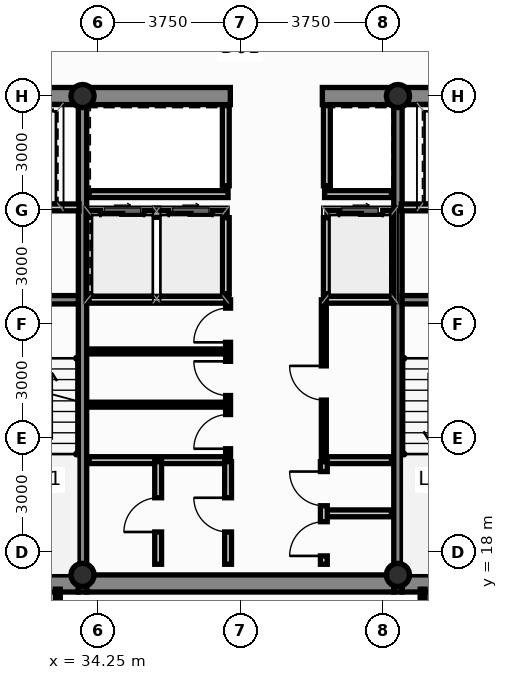
"""IFC4 building model, lengths in metres.
Left out: names, types, materials, properties, quantities, classifications, styles, units other than length and angle.
Written with IfcOpenShell. Run it as: python <this file> out.ifc"""

import sys

from ifc_helpers import new_model, si_unit, direction, frame, frame_2d, origin, origin_2d, place, context, subcontext, project, spatial, rectangle, hollow_circle, extrude, source, transform, mapped, element, fill, save


model = new_model("IFC4")
c1 = context("Model", 3, precision=1e-05, world=origin(), true_north=direction((0.0, 1.0)))
c2 = subcontext(c1, "Body", "Model", "MODEL_VIEW")
j1 = project(units=[si_unit("LENGTHUNIT", "METRE"), si_unit("PLANEANGLEUNIT", "RADIAN")], contexts=[c1])
p1 = place(None, origin())
s1 = spatial("IfcSite", under=j1, at=p1, CompositionType="ELEMENT")
p2 = place(p1, origin())
s2 = spatial("IfcBuilding", under=s1, at=p2, CompositionType="ELEMENT")
p3 = place(p2, frame((0.0, 0.0, 165.8)))
s3 = spatial("IfcBuildingStorey", under=s2, at=p3, CompositionType="ELEMENT", Elevation=165.8)
m1 = source(origin(), c2, "Body", "SweptSolid", [
    extrude(hollow_circle(Radius=0.305, WallThickness=0.025, at=origin_2d()), origin(), (0.0, 0.0, 1.0), 3.65),
])
for number, where, z_axis, x_axis in (
    (1, (33.85, 17.4, 0.0), (0.0, 0.0, 1.0), (1.0, 0.0, 0.0)),
    (2, (42.15, 17.4, 0.0), (0.0, 0.0, 1.0), (1.0, 0.0, 0.0)),
    (3, (33.85, 30.0, 0.0), (0.0, 0.0, 1.0), (1.0, 0.0, 0.0)),
    (4, (42.15, 30.0, 0.0), (0.0, 0.0, 1.0), (1.0, 0.0, 0.0)),
):
    element("IfcColumn", number, at=place(p3, frame(where, z_axis=z_axis, x_axis=x_axis)), inside=s3, PredefinedType="COLUMN", context=c2, shape_type="MappedRepresentation", body=[
        mapped(m1, transform((0.0, 0.0, 0.0), scale=1.0)),
    ])
p4 = place(p3, frame((30.84, 17.175, 0.0), z_axis=(0.0, 0.0, 1.0), x_axis=(1.0, 0.0, 0.0)))
e5 = element("IfcWall", 5, at=p4, inside=s3, PredefinedType="SHEAR", context=c2, shape_type="SweptSolid", body=[
    extrude(rectangle(XDim=2.9, YDim=0.45, at=frame_2d((1.45, 0.0))), origin(), (0.0, 0.0, 1.0), 3.65),
])
p5 = place(p3, frame((33.96, 17.175, 0.0), z_axis=(0.0, 0.0, 1.0), x_axis=(1.0, 0.0, 0.0)))
e6 = element("IfcWall", 6, at=p5, inside=s3, PredefinedType="SHEAR", context=c2, shape_type="SweptSolid", body=[
    extrude(rectangle(XDim=8.08, YDim=0.45, at=frame_2d((4.04, 0.0))), origin(), (0.0, 0.0, 1.0), 3.65),
])
for number, where, z_axis, x_axis in (
    (7, (42.26, 17.175, 0.0), (0.0, 0.0, 1.0), (1.0, 0.0, 0.0)),
    (8, (30.84, 30.0, 0.0), (0.0, 0.0, 1.0), (1.0, 0.0, 0.0)),
):
    element("IfcWall", number, at=place(p3, frame(where, z_axis=z_axis, x_axis=x_axis)), inside=s3, PredefinedType="SHEAR", context=c2, shape_type="SweptSolid", body=[
        extrude(rectangle(XDim=2.9, YDim=0.45, at=frame_2d((1.45, 0.0))), origin(), (0.0, 0.0, 1.0), 3.65),
    ])
p6 = place(p3, frame((33.96, 30.0, 0.0), z_axis=(0.0, 0.0, 1.0), x_axis=(1.0, 0.0, 0.0)))
e9 = element("IfcWall", 9, at=p6, inside=s3, PredefinedType="SHEAR", context=c2, shape_type="SweptSolid", body=[
    extrude(rectangle(XDim=3.78, YDim=0.45, at=frame_2d((1.89, 0.0))), origin(), (0.0, 0.0, 1.0), 3.65),
])
p7 = place(p3, frame((40.16, 30.0, 0.0), z_axis=(0.0, 0.0, 1.0), x_axis=(1.0, 0.0, 0.0)))
e10 = element("IfcWall", 10, at=p7, inside=s3, PredefinedType="SHEAR", context=c2, shape_type="SweptSolid", body=[
    extrude(rectangle(XDim=1.88, YDim=0.45, at=frame_2d((0.94, 0.0))), origin(), (0.0, 0.0, 1.0), 3.65),
])
p8 = place(p3, frame((42.26, 30.0, 0.0), z_axis=(0.0, 0.0, 1.0), x_axis=(1.0, 0.0, 0.0)))
e11 = element("IfcWall", 11, at=p8, inside=s3, PredefinedType="SHEAR", context=c2, shape_type="SweptSolid", body=[
    extrude(rectangle(XDim=2.9, YDim=0.45, at=frame_2d((1.45, 0.0))), origin(), (0.0, 0.0, 1.0), 3.65),
])
for number, where, z_axis, x_axis in (
    (12, (33.85, 16.95, 0.0), (0.0, 0.0, 1.0), (0.0, 1.0, 0.0)),
    (13, (42.15, 16.95, 0.0), (0.0, 0.0, 1.0), (0.0, 1.0, 0.0)),
):
    element("IfcWall", number, at=place(p3, frame(where, z_axis=z_axis, x_axis=x_axis)), inside=s3, PredefinedType="SHEAR", context=c2, shape_type="SweptSolid", body=[
        extrude(rectangle(XDim=13.275, YDim=0.22, at=frame_2d((6.638, 0.0))), origin(), (0.0, 0.0, 1.0), 3.65),
    ])
for number, where, z_axis, x_axis in (
    (14, (30.84, 24.64, 0.0), (0.0, 0.0, 1.0), (1.0, 0.0, 0.0)),
    (15, (42.26, 24.64, 0.0), (0.0, 0.0, 1.0), (1.0, 0.0, 0.0)),
):
    element("IfcWall", number, at=place(p3, frame(where, z_axis=z_axis, x_axis=x_axis)), inside=s3, PredefinedType="SHEAR", context=c2, shape_type="SweptSolid", body=[
        extrude(rectangle(XDim=2.9, YDim=0.22, at=frame_2d((1.45, 0.0))), origin(), (0.0, 0.0, 1.0), 3.65),
    ])
p9 = place(p3, frame((34.02, 26.9, 0.0), z_axis=(0.0, 0.0, 1.0), x_axis=(1.0, 0.0, 0.0)))
e16 = element("IfcWall", 16, at=p9, inside=s3, PredefinedType="PARTITIONING", context=c2, shape_type="SweptSolid", body=[
    extrude(rectangle(XDim=3.6, YDim=0.18, at=frame_2d((1.8, 0.0))), origin(), (0.0, 0.0, 1.0), 3.4),
])
p10 = place(p9, frame((0.3, 0.0, 0.0)))
e17 = element("IfcOpeningElement", 17, at=p10, cuts=e16, PredefinedType="OPENING", context=c2, shape_type="SweptSolid", body=[
    extrude(rectangle(XDim=1.15, YDim=2.2, at=frame_2d((0.575, 1.1))), frame((0.0, 0.102, 0.0), z_axis=(0.0, -1.0, 0.0), x_axis=(1.0, 0.0, 0.0)), (0.0, 0.0, 1.0), 0.204),
])
p11 = place(p9, frame((2.1, 0.0, 0.0)))
e18 = element("IfcOpeningElement", 18, at=p11, cuts=e16, PredefinedType="OPENING", context=c2, shape_type="SweptSolid", body=[
    extrude(rectangle(XDim=1.15, YDim=2.2, at=frame_2d((0.575, 1.1))), frame((0.0, 0.102, 0.0), z_axis=(0.0, -1.0, 0.0), x_axis=(1.0, 0.0, 0.0)), (0.0, 0.0, 1.0), 0.204),
])
p12 = place(p3, frame((40.28, 26.9, 0.0), z_axis=(0.0, 0.0, 1.0), x_axis=(1.0, 0.0, 0.0)))
e19 = element("IfcWall", 19, at=p12, inside=s3, PredefinedType="PARTITIONING", context=c2, shape_type="SweptSolid", body=[
    extrude(rectangle(XDim=1.7, YDim=0.18, at=frame_2d((0.85, 0.0))), origin(), (0.0, 0.0, 1.0), 3.4),
])
p13 = place(p12, frame((0.32, 0.0, 0.0)))
e20 = element("IfcOpeningElement", 20, at=p13, cuts=e19, PredefinedType="OPENING", context=c2, shape_type="SweptSolid", body=[
    extrude(rectangle(XDim=1.15, YDim=2.2, at=frame_2d((0.575, 1.1))), frame((0.0, 0.102, 0.0), z_axis=(0.0, -1.0, 0.0), x_axis=(1.0, 0.0, 0.0)), (0.0, 0.0, 1.0), 0.204),
])
for number, where, z_axis, x_axis in (
    (21, (37.62, 24.8, 0.0), (0.0, 0.0, 1.0), (0.0, 1.0, 0.0)),
    (22, (40.28, 24.8, 0.0), (0.0, 0.0, 1.0), (0.0, 1.0, 0.0)),
):
    element("IfcWall", number, at=place(p3, frame(where, z_axis=z_axis, x_axis=x_axis)), inside=s3, PredefinedType="PARTITIONING", context=c2, shape_type="SweptSolid", body=[
        extrude(rectangle(XDim=2.0, YDim=0.18, at=frame_2d((1.0, 0.0))), origin(), (0.0, 0.0, 1.0), 3.4),
    ])
p14 = place(p3, frame((34.02, 24.64, 0.0), z_axis=(0.0, 0.0, 1.0), x_axis=(1.0, 0.0, 0.0)))
e23 = element("IfcWall", 23, at=p14, inside=s3, PredefinedType="PARTITIONING", context=c2, shape_type="SweptSolid", body=[
    extrude(rectangle(XDim=3.68, YDim=0.18, at=frame_2d((1.84, 0.0))), origin(), (0.0, 0.0, 1.0), 3.4),
])
p15 = place(p3, frame((40.2, 24.64, 0.0), z_axis=(0.0, 0.0, 1.0), x_axis=(1.0, 0.0, 0.0)))
e24 = element("IfcWall", 24, at=p15, inside=s3, PredefinedType="PARTITIONING", context=c2, shape_type="SweptSolid", body=[
    extrude(rectangle(XDim=1.78, YDim=0.18, at=frame_2d((0.89, 0.0))), origin(), (0.0, 0.0, 1.0), 3.4),
])
p16 = place(p3, frame((34.02, 27.42, 0.0), z_axis=(0.0, 0.0, 1.0), x_axis=(1.0, 0.0, 0.0)))
e25 = element("IfcWall", 25, at=p16, inside=s3, PredefinedType="PARTITIONING", context=c2, shape_type="SweptSolid", body=[
    extrude(rectangle(XDim=3.66, YDim=0.18, at=frame_2d((1.83, 0.0))), origin(), (0.0, 0.0, 1.0), 3.4),
])
p17 = place(p3, frame((40.22, 27.42, 0.0), z_axis=(0.0, 0.0, 1.0), x_axis=(1.0, 0.0, 0.0)))
e26 = element("IfcWall", 26, at=p17, inside=s3, PredefinedType="PARTITIONING", context=c2, shape_type="SweptSolid", body=[
    extrude(rectangle(XDim=1.76, YDim=0.18, at=frame_2d((0.88, 0.0))), origin(), (0.0, 0.0, 1.0), 3.4),
])
for number, where, z_axis, x_axis in (
    (27, (37.62, 27.64, 0.0), (0.0, 0.0, 1.0), (0.0, 1.0, 0.0)),
    (28, (40.28, 27.64, 0.0), (0.0, 0.0, 1.0), (0.0, 1.0, 0.0)),
):
    element("IfcWall", number, at=place(p3, frame(where, z_axis=z_axis, x_axis=x_axis)), inside=s3, PredefinedType="PARTITIONING", context=c2, shape_type="SweptSolid", body=[
        extrude(rectangle(XDim=2.11, YDim=0.18, at=frame_2d((1.055, 0.0))), origin(), (0.0, 0.0, 1.0), 3.4),
    ])
for number, where, z_axis, x_axis in (
    (29, (30.86, 27.07, 0.0), (0.0, 0.0, 1.0), (1.0, 0.0, 0.0)),
    (30, (42.24, 27.07, 0.0), (0.0, 0.0, 1.0), (1.0, 0.0, 0.0)),
):
    element("IfcWall", number, at=place(p3, frame(where, z_axis=z_axis, x_axis=x_axis)), inside=s3, PredefinedType="PARTITIONING", context=c2, shape_type="SweptSolid", body=[
        extrude(rectangle(XDim=2.9, YDim=0.18, at=frame_2d((1.45, 0.0))), origin(), (0.0, 0.0, 1.0), 3.4),
    ])
p18 = place(p3, frame((34.02, 20.42, 0.0), z_axis=(0.0, 0.0, 1.0), x_axis=(1.0, 0.0, 0.0)))
e31 = element("IfcWall", 31, at=p18, inside=s3, PredefinedType="PARTITIONING", context=c2, shape_type="SweptSolid", body=[
    extrude(rectangle(XDim=3.64, YDim=0.18, at=frame_2d((1.82, 0.0))), origin(), (0.0, 0.0, 1.0), 3.4),
])
p19 = place(p3, frame((40.22, 20.42, 0.0), z_axis=(0.0, 0.0, 1.0), x_axis=(1.0, 0.0, 0.0)))
e32 = element("IfcWall", 32, at=p19, inside=s3, PredefinedType="PARTITIONING", context=c2, shape_type="SweptSolid", body=[
    extrude(rectangle(XDim=1.76, YDim=0.18, at=frame_2d((0.88, 0.0))), origin(), (0.0, 0.0, 1.0), 3.4),
])
for number, where, z_axis, x_axis in (
    (33, (34.02, 21.88, 0.0), (0.0, 0.0, 1.0), (1.0, 0.0, 0.0)),
    (34, (34.02, 23.28, 0.0), (0.0, 0.0, 1.0), (1.0, 0.0, 0.0)),
):
    element("IfcWall", number, at=place(p3, frame(where, z_axis=z_axis, x_axis=x_axis)), inside=s3, PredefinedType="PARTITIONING", context=c2, shape_type="SweptSolid", body=[
        extrude(rectangle(XDim=3.58, YDim=0.13, at=frame_2d((1.79, 0.0))), origin(), (0.0, 0.0, 1.0), 3.4),
    ])
p20 = place(p3, frame((37.68, 20.5, 0.0), z_axis=(0.0, 0.0, 1.0), x_axis=(0.0, 1.0, 0.0)))
e35 = element("IfcWall", 35, at=p20, inside=s3, PredefinedType="PARTITIONING", context=c2, shape_type="SweptSolid", body=[
    extrude(rectangle(XDim=4.14, YDim=0.13, at=frame_2d((2.07, 0.0))), origin(), (0.0, 0.0, 1.0), 3.4),
])
p21 = place(p20, frame((0.22, 0.0, 0.0)))
e36 = element("IfcOpeningElement", 36, at=p21, cuts=e35, PredefinedType="OPENING", context=c2, shape_type="SweptSolid", body=[
    extrude(rectangle(XDim=0.9, YDim=2.1, at=frame_2d((0.45, 1.05))), frame((0.0, 0.077, 0.0), z_axis=(0.0, -1.0, 0.0), x_axis=(1.0, 0.0, 0.0)), (0.0, 0.0, 1.0), 0.154),
])
p22 = place(p20, frame((1.62, 0.0, 0.0)))
e37 = element("IfcOpeningElement", 37, at=p22, cuts=e35, PredefinedType="OPENING", context=c2, shape_type="SweptSolid", body=[
    extrude(rectangle(XDim=0.9, YDim=2.1, at=frame_2d((0.45, 1.05))), frame((0.0, 0.077, 0.0), z_axis=(0.0, -1.0, 0.0), x_axis=(1.0, 0.0, 0.0)), (0.0, 0.0, 1.0), 0.154),
])
p23 = place(p20, frame((3.02, 0.0, 0.0)))
e38 = element("IfcOpeningElement", 38, at=p23, cuts=e35, PredefinedType="OPENING", context=c2, shape_type="SweptSolid", body=[
    extrude(rectangle(XDim=0.9, YDim=2.1, at=frame_2d((0.45, 1.05))), frame((0.0, 0.077, 0.0), z_axis=(0.0, -1.0, 0.0), x_axis=(1.0, 0.0, 0.0)), (0.0, 0.0, 1.0), 0.154),
])
p24 = place(p3, frame((40.2, 20.5, 0.0), z_axis=(0.0, 0.0, 1.0), x_axis=(0.0, 1.0, 0.0)))
e39 = element("IfcWall", 39, at=p24, inside=s3, PredefinedType="PARTITIONING", context=c2, shape_type="SweptSolid", body=[
    extrude(rectangle(XDim=4.14, YDim=0.13, at=frame_2d((2.07, 0.0))), origin(), (0.0, 0.0, 1.0), 3.4),
])
p25 = place(p24, frame((1.5, 0.0, 0.0)))
e40 = element("IfcOpeningElement", 40, at=p25, cuts=e39, PredefinedType="OPENING", context=c2, shape_type="SweptSolid", body=[
    extrude(rectangle(XDim=0.9, YDim=2.1, at=frame_2d((0.45, 1.05))), frame((0.0, 0.077, 0.0), z_axis=(0.0, -1.0, 0.0), x_axis=(1.0, 0.0, 0.0)), (0.0, 0.0, 1.0), 0.154),
])
p26 = place(p3, frame((35.84, 17.68, 0.0), z_axis=(0.0, 0.0, 1.0), x_axis=(0.0, 1.0, 0.0)))
e41 = element("IfcWall", 41, at=p26, inside=s3, PredefinedType="PARTITIONING", context=c2, shape_type="SweptSolid", body=[
    extrude(rectangle(XDim=2.7, YDim=0.18, at=frame_2d((1.35, 0.0))), origin(), (0.0, 0.0, 1.0), 3.4),
])
p27 = place(p26, frame((0.85, 0.0, 0.0)))
e42 = element("IfcOpeningElement", 42, at=p27, cuts=e41, PredefinedType="OPENING", context=c2, shape_type="SweptSolid", body=[
    extrude(rectangle(XDim=0.9, YDim=2.1, at=frame_2d((0.45, 1.05))), frame((0.0, 0.102, 0.0), z_axis=(0.0, -1.0, 0.0), x_axis=(1.0, 0.0, 0.0)), (0.0, 0.0, 1.0), 0.204),
])
p28 = place(p3, frame((37.68, 17.68, 0.0), z_axis=(0.0, 0.0, 1.0), x_axis=(0.0, 1.0, 0.0)))
e43 = element("IfcWall", 43, at=p28, inside=s3, PredefinedType="PARTITIONING", context=c2, shape_type="SweptSolid", body=[
    extrude(rectangle(XDim=2.7, YDim=0.18, at=frame_2d((1.35, 0.0))), origin(), (0.0, 0.0, 1.0), 3.4),
])
p29 = place(p28, frame((0.85, 0.0, 0.0)))
e44 = element("IfcOpeningElement", 44, at=p29, cuts=e43, PredefinedType="OPENING", context=c2, shape_type="SweptSolid", body=[
    extrude(rectangle(XDim=0.9, YDim=2.1, at=frame_2d((0.45, 1.05))), frame((0.0, 0.102, 0.0), z_axis=(0.0, -1.0, 0.0), x_axis=(1.0, 0.0, 0.0)), (0.0, 0.0, 1.0), 0.204),
])
p30 = place(p3, frame((40.28, 19.02, 0.0), z_axis=(0.0, 0.0, 1.0), x_axis=(1.0, 0.0, 0.0)))
e45 = element("IfcWall", 45, at=p30, inside=s3, PredefinedType="PARTITIONING", context=c2, shape_type="SweptSolid", body=[
    extrude(rectangle(XDim=1.7, YDim=0.18, at=frame_2d((0.85, 0.0))), origin(), (0.0, 0.0, 1.0), 3.4),
])
p31 = place(p3, frame((40.2, 17.68, 0.0), z_axis=(0.0, 0.0, 1.0), x_axis=(0.0, 1.0, 0.0)))
e46 = element("IfcWall", 46, at=p31, inside=s3, PredefinedType="PARTITIONING", context=c2, shape_type="SweptSolid", body=[
    extrude(rectangle(XDim=2.7, YDim=0.18, at=frame_2d((1.35, 0.0))), origin(), (0.0, 0.0, 1.0), 3.4),
])
p32 = place(p31, frame((0.22, 0.0, 0.0)))
e47 = element("IfcOpeningElement", 47, at=p32, cuts=e46, PredefinedType="OPENING", context=c2, shape_type="SweptSolid", body=[
    extrude(rectangle(XDim=0.9, YDim=2.1, at=frame_2d((0.45, 1.05))), frame((0.0, 0.102, 0.0), z_axis=(0.0, -1.0, 0.0), x_axis=(1.0, 0.0, 0.0)), (0.0, 0.0, 1.0), 0.204),
])
p33 = place(p31, frame((1.54, 0.0, 0.0)))
e48 = element("IfcOpeningElement", 48, at=p33, cuts=e46, PredefinedType="OPENING", context=c2, shape_type="SweptSolid", body=[
    extrude(rectangle(XDim=0.9, YDim=2.1, at=frame_2d((0.45, 1.05))), frame((0.0, 0.102, 0.0), z_axis=(0.0, -1.0, 0.0), x_axis=(1.0, 0.0, 0.0)), (0.0, 0.0, 1.0), 0.204),
])
for number, where, z_axis, x_axis in (
    (49, (33.2, 13.585, 0.0), (0.0, 0.0, 1.0), (0.0, 1.0, 0.0)),
    (50, (42.8, 13.585, 0.0), (0.0, 0.0, 1.0), (0.0, 1.0, 0.0)),
):
    element("IfcWall", number, at=place(p3, frame(where, z_axis=z_axis, x_axis=x_axis)), inside=s3, PredefinedType="PARTITIONING", context=c2, shape_type="SweptSolid", body=[
        extrude(rectangle(XDim=3.44, YDim=0.13, at=frame_2d((1.72, 0.0))), origin(), (0.0, 0.0, 1.0), 3.4),
    ])
p34 = place(p10, origin())
e51 = element("IfcDoor", 51, at=p34, inside=s3, OperationType="SLIDING_TO_LEFT", PredefinedType="DOOR", context=c2, shape_type="SweptSolid", body=[
    extrude(rectangle(XDim=1.15, YDim=2.2, at=frame_2d((0.575, 1.1))), frame((0.0, 0.025, 0.0), z_axis=(0.0, -1.0, 0.0), x_axis=(1.0, 0.0, 0.0)), (0.0, 0.0, 1.0), 0.05),
])
fill(e17, e51)
p35 = place(p11, origin())
e52 = element("IfcDoor", 52, at=p35, inside=s3, OperationType="SLIDING_TO_RIGHT", PredefinedType="DOOR", context=c2, shape_type="SweptSolid", body=[
    extrude(rectangle(XDim=1.15, YDim=2.2, at=frame_2d((0.575, 1.1))), frame((0.0, 0.025, 0.0), z_axis=(0.0, -1.0, 0.0), x_axis=(1.0, 0.0, 0.0)), (0.0, 0.0, 1.0), 0.05),
])
fill(e18, e52)
p36 = place(p13, origin())
e53 = element("IfcDoor", 53, at=p36, inside=s3, OperationType="SLIDING_TO_LEFT", PredefinedType="DOOR", context=c2, shape_type="SweptSolid", body=[
    extrude(rectangle(XDim=1.15, YDim=2.2, at=frame_2d((0.575, 1.1))), frame((0.0, 0.025, 0.0), z_axis=(0.0, -1.0, 0.0), x_axis=(1.0, 0.0, 0.0)), (0.0, 0.0, 1.0), 0.05),
])
fill(e20, e53)
p37 = place(p21, origin())
e54 = element("IfcDoor", 54, at=p37, inside=s3, OperationType="SINGLE_SWING_LEFT", PredefinedType="DOOR", context=c2, shape_type="SweptSolid", body=[
    extrude(rectangle(XDim=0.9, YDim=2.1, at=frame_2d((0.45, 1.05))), frame((0.0, 0.025, 0.0), z_axis=(0.0, -1.0, 0.0), x_axis=(1.0, 0.0, 0.0)), (0.0, 0.0, 1.0), 0.05),
])
fill(e36, e54)
p38 = place(p22, origin())
e55 = element("IfcDoor", 55, at=p38, inside=s3, OperationType="SINGLE_SWING_RIGHT", PredefinedType="DOOR", context=c2, shape_type="SweptSolid", body=[
    extrude(rectangle(XDim=0.9, YDim=2.1, at=frame_2d((0.45, 1.05))), frame((0.0, 0.025, 0.0), z_axis=(0.0, -1.0, 0.0), x_axis=(1.0, 0.0, 0.0)), (0.0, 0.0, 1.0), 0.05),
])
fill(e37, e55)
p39 = place(p23, origin())
e56 = element("IfcDoor", 56, at=p39, inside=s3, OperationType="SINGLE_SWING_LEFT", PredefinedType="DOOR", context=c2, shape_type="SweptSolid", body=[
    extrude(rectangle(XDim=0.9, YDim=2.1, at=frame_2d((0.45, 1.05))), frame((0.0, 0.025, 0.0), z_axis=(0.0, -1.0, 0.0), x_axis=(1.0, 0.0, 0.0)), (0.0, 0.0, 1.0), 0.05),
])
fill(e38, e56)
p40 = place(p25, origin())
e57 = element("IfcDoor", 57, at=p40, inside=s3, OperationType="SINGLE_SWING_RIGHT", PredefinedType="DOOR", context=c2, shape_type="SweptSolid", body=[
    extrude(rectangle(XDim=0.9, YDim=2.1, at=frame_2d((0.45, 1.05))), frame((0.0, 0.025, 0.0), z_axis=(0.0, -1.0, 0.0), x_axis=(1.0, 0.0, 0.0)), (0.0, 0.0, 1.0), 0.05),
])
fill(e40, e57)
p41 = place(p27, origin())
e58 = element("IfcDoor", 58, at=p41, inside=s3, OperationType="SINGLE_SWING_LEFT", PredefinedType="DOOR", context=c2, shape_type="SweptSolid", body=[
    extrude(rectangle(XDim=0.9, YDim=2.1, at=frame_2d((0.45, 1.05))), frame((0.0, 0.025, 0.0), z_axis=(0.0, -1.0, 0.0), x_axis=(1.0, 0.0, 0.0)), (0.0, 0.0, 1.0), 0.05),
])
fill(e42, e58)
p42 = place(p29, origin())
e59 = element("IfcDoor", 59, at=p42, inside=s3, OperationType="SINGLE_SWING_RIGHT", PredefinedType="DOOR", context=c2, shape_type="SweptSolid", body=[
    extrude(rectangle(XDim=0.9, YDim=2.1, at=frame_2d((0.45, 1.05))), frame((0.0, 0.025, 0.0), z_axis=(0.0, -1.0, 0.0), x_axis=(1.0, 0.0, 0.0)), (0.0, 0.0, 1.0), 0.05),
])
fill(e44, e59)
p43 = place(p32, origin())
e60 = element("IfcDoor", 60, at=p43, inside=s3, OperationType="SINGLE_SWING_LEFT", PredefinedType="DOOR", context=c2, shape_type="SweptSolid", body=[
    extrude(rectangle(XDim=0.9, YDim=2.1, at=frame_2d((0.45, 1.05))), frame((0.0, 0.025, 0.0), z_axis=(0.0, -1.0, 0.0), x_axis=(1.0, 0.0, 0.0)), (0.0, 0.0, 1.0), 0.05),
])
fill(e47, e60)
p44 = place(p33, origin())
e61 = element("IfcDoor", 61, at=p44, inside=s3, OperationType="SINGLE_SWING_RIGHT", PredefinedType="DOOR", context=c2, shape_type="SweptSolid", body=[
    extrude(rectangle(XDim=0.9, YDim=2.1, at=frame_2d((0.45, 1.05))), frame((0.0, 0.025, 0.0), z_axis=(0.0, -1.0, 0.0), x_axis=(1.0, 0.0, 0.0)), (0.0, 0.0, 1.0), 0.05),
])
fill(e48, e61)
save(model, sys.argv[1])
